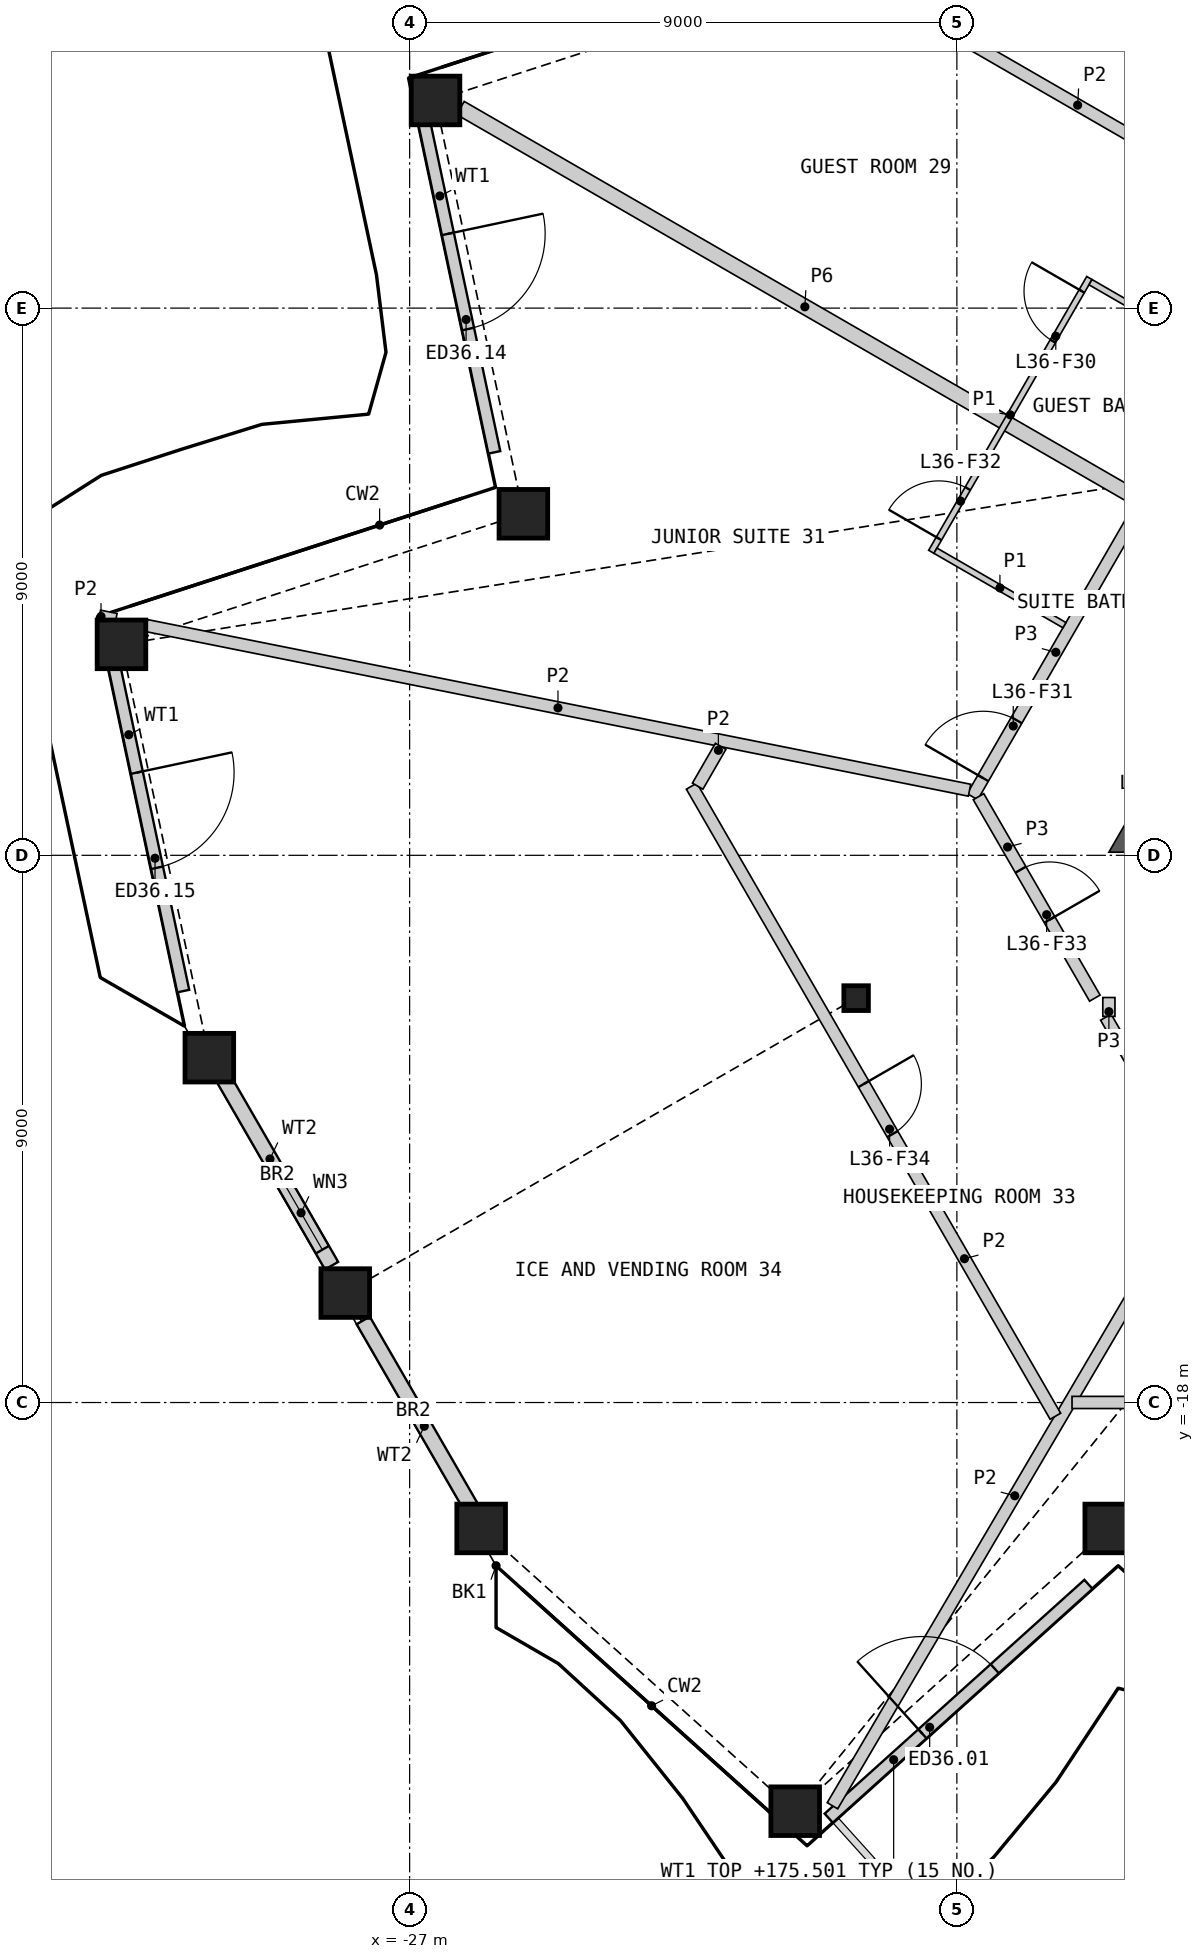
"""IFC4 building model, lengths in metres.
Left out: names, types, materials, properties, quantities, classifications, styles, units other than length and angle.
Written with IfcOpenShell. Run it as: python <this file> out.ifc"""

import sys

from ifc_helpers import new_model, si_unit, direction, frame, frame_2d, origin, origin_2d, place, context, subcontext, project, spatial, polyline, rectangle, hollow_rectangle, i_section, outline, extrude, element, fill, save


model = new_model("IFC4")
c1 = context("Model", 3, precision=1e-05, world=origin(), true_north=direction((0.0, 1.0)))
c2 = subcontext(c1, "Body", "Model", "MODEL_VIEW")
j1 = project(units=[si_unit("LENGTHUNIT", "METRE"), si_unit("PLANEANGLEUNIT", "RADIAN")], contexts=[c1])
p1 = place(None, origin())
s1 = spatial("IfcSite", under=j1, at=p1, CompositionType="ELEMENT")
p2 = place(p1, origin())
s2 = spatial("IfcBuilding", under=s1, at=p2, CompositionType="ELEMENT")
p3 = place(p2, frame((0.0, 0.0, 172.8)))
s3 = spatial("IfcBuildingStorey", under=s2, at=p3, CompositionType="ELEMENT", Elevation=172.8)
for number, where, z_axis, x_axis in (
    (1, (-25.823, -20.071, 0.0), (0.0, 0.0, 1.0), (1.0, 0.0, 0.0)),
    (2, (-20.659, -24.722, 0.0), (0.0, 0.0, 1.0), (1.0, 0.0, 0.0)),
    (3, (-15.494, -20.071, 0.0), (0.0, 0.0, 1.0), (1.0, 0.0, 0.0)),
    (4, (-26.574, 3.415, 0.0), (0.0, 0.0, 1.0), (1.0, 0.0, 0.0)),
    (5, (-25.129, -3.383, 0.0), (0.0, 0.0, 1.0), (1.0, 0.0, 0.0)),
    (6, (-31.739, -5.53, 0.0), (0.0, 0.0, 1.0), (1.0, 0.0, 0.0)),
    (7, (-30.294, -12.328, 0.0), (0.0, 0.0, 1.0), (1.0, 0.0, 0.0)),
    (8, (-28.059, -16.2, 0.0), (0.0, 0.0, 1.0), (1.0, 0.0, 0.0)),
):
    element("IfcColumn", number, at=place(p3, frame(where, z_axis=z_axis, x_axis=x_axis)), inside=s3, PredefinedType="COLUMN", context=c2, shape_type="SweptSolid", body=[
        extrude(hollow_rectangle(XDim=0.8, YDim=0.8, WallThickness=0.05, at=origin_2d()), origin(), (0.0, 0.0, 1.0), 3.6),
    ])
p4 = place(p3, frame((-19.657, -11.349, 0.0), z_axis=(0.0, 0.0, 1.0), x_axis=(1.0, 0.0, 0.0)))
e9 = element("IfcColumn", 9, at=p4, inside=s3, PredefinedType="COLUMN", context=c2, shape_type="SweptSolid", body=[
    extrude(i_section(OverallWidth=0.404, OverallDepth=0.407, WebThickness=0.027, FlangeThickness=0.044, at=origin_2d()), origin(), (0.0, 0.0, 1.0), 3.6),
])
p5 = place(p3, frame((-20.108, -24.836, 0.0), z_axis=(0.0, 0.0, 1.0), x_axis=(0.74315473474, 0.669119600844, 0.0)))
e10 = element("IfcWall", 10, at=p5, inside=s3, PredefinedType="SOLIDWALL", context=c2, shape_type="SweptSolid", body=[
    extrude(rectangle(XDim=5.748, YDim=0.2, at=frame_2d((2.874, 0.0))), origin(), (0.0, 0.0, 1.0), 2.701),
])
p6 = place(p5, frame((2.074, 0.0, 0.0)))
e11 = element("IfcOpeningElement", 11, at=p6, cuts=e10, PredefinedType="OPENING", context=c2, shape_type="SweptSolid", body=[
    extrude(rectangle(XDim=1.6, YDim=2.4, at=frame_2d((0.8, 1.2))), frame((0.0, 0.11, 0.0), z_axis=(0.0, -1.0, 0.0), x_axis=(1.0, 0.0, 0.0)), (0.0, 0.0, 1.0), 0.22),
])
p7 = place(p3, frame((-26.802, 3.25, 0.0), z_axis=(0.0, 0.0, 1.0), x_axis=(0.207921749173, -0.97814546271, 0.0)))
e12 = element("IfcWall", 12, at=p7, inside=s3, PredefinedType="SOLIDWALL", context=c2, shape_type="SweptSolid", body=[
    extrude(rectangle(XDim=5.748, YDim=0.2, at=frame_2d((2.874, 0.0))), origin(), (0.0, 0.0, 1.0), 2.701),
])
p8 = place(p7, frame((2.074, 0.0, 0.0)))
e13 = element("IfcOpeningElement", 13, at=p8, cuts=e12, PredefinedType="OPENING", context=c2, shape_type="SweptSolid", body=[
    extrude(rectangle(XDim=1.6, YDim=2.4, at=frame_2d((0.8, 1.2))), frame((0.0, 0.11, 0.0), z_axis=(0.0, -1.0, 0.0), x_axis=(1.0, 0.0, 0.0)), (0.0, 0.0, 1.0), 0.22),
])
p9 = place(p3, frame((-31.918, -5.611, 0.0), z_axis=(0.0, 0.0, 1.0), x_axis=(0.207913110781, -0.97814729891, 0.0)))
e14 = element("IfcWall", 14, at=p9, inside=s3, PredefinedType="SOLIDWALL", context=c2, shape_type="SweptSolid", body=[
    extrude(rectangle(XDim=5.748, YDim=0.2, at=frame_2d((2.874, 0.0))), origin(), (0.0, 0.0, 1.0), 2.701),
])
p10 = place(p9, frame((2.074, 0.0, 0.0)))
e15 = element("IfcOpeningElement", 15, at=p10, cuts=e14, PredefinedType="OPENING", context=c2, shape_type="SweptSolid", body=[
    extrude(rectangle(XDim=1.6, YDim=2.4, at=frame_2d((0.8, 1.2))), frame((0.0, 0.11, 0.0), z_axis=(0.0, -1.0, 0.0), x_axis=(1.0, 0.0, 0.0)), (0.0, 0.0, 1.0), 0.22),
])
p11 = place(p3, frame((-30.31, -12.239, 0.0), z_axis=(0.0, 0.0, 1.0), x_axis=(0.500005680777, -0.866022123962, 0.0)))
e16 = element("IfcWall", 16, at=p11, inside=s3, PredefinedType="SOLIDWALL", context=c2, shape_type="SweptSolid", body=[
    extrude(rectangle(XDim=4.054, YDim=0.25, at=frame_2d((2.027, 0.0))), origin(), (0.0, 0.0, 1.0), 2.701),
])
p12 = place(p11, frame((2.35, 0.0, 1.7)))
e17 = element("IfcOpeningElement", 17, at=p12, cuts=e16, PredefinedType="OPENING", context=c2, shape_type="SweptSolid", body=[
    extrude(rectangle(XDim=1.4, YDim=0.8, at=frame_2d((0.7, 0.4))), frame((0.0, 0.135, 0.0), z_axis=(0.0, -1.0, 0.0), x_axis=(1.0, 0.0, 0.0)), (0.0, 0.0, 1.0), 0.27),
])
p13 = place(p3, frame((-27.764, -16.65, 0.0), z_axis=(0.0, 0.0, 1.0), x_axis=(0.500039726511, -0.866002466458, 0.0)))
e18 = element("IfcWall", 18, at=p13, inside=s3, PredefinedType="SOLIDWALL", context=c2, shape_type="SweptSolid", body=[
    extrude(rectangle(XDim=4.019, YDim=0.25, at=frame_2d((2.009, 0.0))), origin(), (0.0, 0.0, 1.0), 2.701),
])
p14 = place(p3, origin())
e19 = element("IfcWall", 19, at=p14, inside=s3, PredefinedType="SHEAR", context=c2, shape_type="SweptSolid", body=[
    extrude(outline(polyline([(-14.851, -7.824), (-14.201, -8.199), (-14.201, -8.949), (-15.5, -8.949), (-14.851, -7.824)])), origin(), (0.0, 0.0, 1.0), 3.25),
])
p15 = place(p3, frame((-26.164, 3.292, 0.0), z_axis=(0.0, 0.0, 1.0), x_axis=(0.866022412254, -0.500005181446, 0.0)))
e20 = element("IfcWall", 20, at=p15, inside=s3, PredefinedType="PARTITIONING", context=c2, shape_type="SweptSolid", body=[
    extrude(rectangle(XDim=13.081, YDim=0.25, at=frame_2d((6.541, 0.0))), origin(), (0.0, 0.0, 1.0), 2.404),
])
p16 = place(p3, frame((-17.744, -8.035, 0.0), z_axis=(0.0, 0.0, 1.0), x_axis=(0.500007607708, 0.866021011428, 0.0)))
e21 = element("IfcWall", 21, at=p16, inside=s3, PredefinedType="PARTITIONING", context=c2, shape_type="SweptSolid", body=[
    extrude(rectangle(XDim=5.484, YDim=0.2, at=frame_2d((2.742, 0.0))), origin(), (0.0, 0.0, 1.0), 3.25),
])
p17 = place(p16, frame((0.352, 0.0, 0.0)))
e22 = element("IfcOpeningElement", 22, at=p17, cuts=e21, PredefinedType="OPENING", context=c2, shape_type="SweptSolid", body=[
    extrude(rectangle(XDim=1.1, YDim=2.1, at=frame_2d((0.55, 1.05))), frame((0.0, 0.11, 0.0), z_axis=(0.0, -1.0, 0.0), x_axis=(1.0, 0.0, 0.0)), (0.0, 0.0, 1.0), 0.22),
])
p18 = place(p3, frame((-17.644, -8.035, 0.0), z_axis=(0.0, 0.0, 1.0), x_axis=(0.499961815444, -0.866047448526, 0.0)))
e23 = element("IfcWall", 23, at=p18, inside=s3, PredefinedType="PARTITIONING", context=c2, shape_type="SweptSolid", body=[
    extrude(rectangle(XDim=3.826, YDim=0.2, at=frame_2d((1.913, 0.0))), origin(), (0.0, 0.0, 1.0), 3.25),
])
p19 = place(p18, frame((1.386, 0.0, 0.0)))
e24 = element("IfcOpeningElement", 24, at=p19, cuts=e23, PredefinedType="OPENING", context=c2, shape_type="SweptSolid", body=[
    extrude(rectangle(XDim=0.95, YDim=2.1, at=frame_2d((0.475, 1.05))), frame((0.0, 0.11, 0.0), z_axis=(0.0, -1.0, 0.0), x_axis=(1.0, 0.0, 0.0)), (0.0, 0.0, 1.0), 0.22),
])
p20 = place(p3, frame((-15.55, -11.662, 0.0), z_axis=(0.0, 0.0, 1.0), x_axis=(0.500048608389, -0.865997337899, 0.0)))
e25 = element("IfcWall", 25, at=p20, inside=s3, PredefinedType="PARTITIONING", context=c2, shape_type="SweptSolid", body=[
    extrude(rectangle(XDim=3.002, YDim=0.2, at=frame_2d((1.501, 0.0))), origin(), (0.0, 0.0, 1.0), 3.25),
])
p21 = place(p3, frame((-15.5, -11.649, 0.0), z_axis=(0.0, 0.0, 1.0), x_axis=(0.0, 1.0, 0.0)))
e26 = element("IfcWall", 26, at=p21, inside=s3, PredefinedType="PARTITIONING", context=c2, shape_type="SweptSolid", body=[
    extrude(rectangle(XDim=0.31, YDim=0.2, at=frame_2d((0.155, 0.0))), origin(), (0.0, 0.0, 1.0), 3.25),
])
p22 = place(p3, frame((-31.329, -5.221, 0.0), z_axis=(0.0, 0.0, 1.0), x_axis=(0.980565709097, -0.196190953266, 0.0)))
e27 = element("IfcWall", 27, at=p22, inside=s3, PredefinedType="PARTITIONING", context=c2, shape_type="SweptSolid", body=[
    extrude(rectangle(XDim=13.805, YDim=0.2, at=frame_2d((6.903, 0.0))), origin(), (0.0, 0.0, 1.0), 2.404),
])
p23 = place(p3, frame((-20.046, -24.632, 0.0), z_axis=(0.0, 0.0, 1.0), x_axis=(0.50691549935, 0.86199575203, 0.0)))
e28 = element("IfcWall", 28, at=p23, inside=s3, PredefinedType="PARTITIONING", context=c2, shape_type="SweptSolid", body=[
    extrude(rectangle(XDim=11.83, YDim=0.2, at=frame_2d((5.915, 0.0))), origin(), (0.0, 0.0, 1.0), 2.404),
])
p24 = place(p3, frame((-22.363, -7.862, 0.0), z_axis=(0.0, 0.0, 1.0), x_axis=(0.500009728207, -0.866019787128, 0.0)))
e29 = element("IfcWall", 29, at=p24, inside=s3, PredefinedType="PARTITIONING", context=c2, shape_type="SweptSolid", body=[
    extrude(rectangle(XDim=11.967, YDim=0.2, at=frame_2d((5.983, 0.0))), origin(), (0.0, 0.0, 1.0), 2.404),
])
p25 = place(p24, frame((5.658, 0.0, 0.0)))
e30 = element("IfcOpeningElement", 30, at=p25, cuts=e29, PredefinedType="OPENING", context=c2, shape_type="SweptSolid", body=[
    extrude(rectangle(XDim=0.95, YDim=2.1, at=frame_2d((0.475, 1.05))), frame((0.0, 0.11, 0.0), z_axis=(0.0, -1.0, 0.0), x_axis=(1.0, 0.0, 0.0)), (0.0, 0.0, 1.0), 0.22),
])
p26 = place(p3, frame((-19.555, 5.383, 0.0), z_axis=(0.0, 0.0, 1.0), x_axis=(0.866027979776, -0.499995538225, 0.0)))
e31 = element("IfcWall", 31, at=p26, inside=s3, PredefinedType="PARTITIONING", context=c2, shape_type="SweptSolid", body=[
    extrude(rectangle(XDim=8.177, YDim=0.2, at=frame_2d((4.089, 0.0))), origin(), (0.0, 0.0, 1.0), 2.404),
])
p27 = place(p3, frame((-16.106, -17.999, 0.0), z_axis=(0.0, 0.0, 1.0), x_axis=(1.0, 0.0, 0.0)))
e32 = element("IfcWall", 32, at=p27, inside=s3, PredefinedType="PARTITIONING", context=c2, shape_type="SweptSolid", body=[
    extrude(rectangle(XDim=5.775, YDim=0.2, at=frame_2d((2.887, 0.0))), origin(), (0.0, 0.0, 1.0), 2.404),
])
p28 = place(p27, frame((2.06, 0.0, 0.0)))
e33 = element("IfcOpeningElement", 33, at=p28, cuts=e32, PredefinedType="OPENING", context=c2, shape_type="SweptSolid", body=[
    extrude(rectangle(XDim=0.95, YDim=2.1, at=frame_2d((0.475, 1.05))), frame((0.0, 0.11, 0.0), z_axis=(0.0, -1.0, 0.0), x_axis=(1.0, 0.0, 0.0)), (0.0, 0.0, 1.0), 0.22),
])
p29 = place(p3, frame((-22.263, -7.862, 0.0), z_axis=(0.0, 0.0, 1.0), x_axis=(0.499852814723, 0.866110364569, 0.0)))
e34 = element("IfcWall", 34, at=p29, inside=s3, PredefinedType="PARTITIONING", context=c2, shape_type="SweptSolid", body=[
    extrude(rectangle(XDim=0.757, YDim=0.2, at=frame_2d((0.378, 0.0))), origin(), (0.0, 0.0, 1.0), 2.404),
])
p30 = place(p3, frame((-32.103, -5.066, 0.0), z_axis=(0.0, 0.0, 1.0), x_axis=(0.980512850695, -0.19645495571, 0.0)))
e35 = element("IfcWall", 35, at=p30, inside=s3, PredefinedType="PARTITIONING", context=c2, shape_type="SweptSolid", body=[
    extrude(rectangle(XDim=0.277, YDim=0.2, at=frame_2d((0.139, 0.0))), origin(), (0.0, 0.0, 1.0), 2.404),
])
p31 = place(p3, frame((-18.421, -4.008, 0.0), z_axis=(0.0, 0.0, 1.0), x_axis=(0.500006934395, 0.866021400173, 0.0)))
e36 = element("IfcWall", 36, at=p31, inside=s3, PredefinedType="PARTITIONING", context=c2, shape_type="SweptSolid", body=[
    extrude(rectangle(XDim=5.2, YDim=0.1, at=frame_2d((2.6, 0.0))), origin(), (0.0, 0.0, 1.0), 2.404),
])
p32 = place(p31, frame((4.0, 0.0, 0.0)))
e37 = element("IfcOpeningElement", 37, at=p32, cuts=e36, PredefinedType="OPENING", context=c2, shape_type="SweptSolid", body=[
    extrude(rectangle(XDim=0.95, YDim=2.1, at=frame_2d((0.475, 1.05))), frame((0.0, 0.06, 0.0), z_axis=(0.0, -1.0, 0.0), x_axis=(1.0, 0.0, 0.0)), (0.0, 0.0, 1.0), 0.12),
])
p33 = place(p31, frame((0.25, 0.0, 0.0)))
e38 = element("IfcOpeningElement", 38, at=p33, cuts=e36, PredefinedType="OPENING", context=c2, shape_type="SweptSolid", body=[
    extrude(rectangle(XDim=0.95, YDim=2.1, at=frame_2d((0.475, 1.05))), frame((0.0, 0.06, 0.0), z_axis=(0.0, -1.0, 0.0), x_axis=(1.0, 0.0, 0.0)), (0.0, 0.0, 1.0), 0.12),
])
p34 = place(p3, frame((-18.353, -3.99, 0.0), z_axis=(0.0, 0.0, 1.0), x_axis=(0.866057815567, -0.499943856944, 0.0)))
e39 = element("IfcWall", 39, at=p34, inside=s3, PredefinedType="PARTITIONING", context=c2, shape_type="SweptSolid", body=[
    extrude(rectangle(XDim=2.45, YDim=0.1, at=frame_2d((1.225, 0.0))), origin(), (0.0, 0.0, 1.0), 2.404),
])
p35 = place(p3, frame((-15.802, 0.427, 0.0), z_axis=(0.0, 0.0, 1.0), x_axis=(0.866032905446, -0.499987006516, 0.0)))
e40 = element("IfcWall", 40, at=p35, inside=s3, PredefinedType="PARTITIONING", context=c2, shape_type="SweptSolid", body=[
    extrude(rectangle(XDim=2.45, YDim=0.1, at=frame_2d((1.225, 0.0))), origin(), (0.0, 0.0, 1.0), 2.404),
])
p36 = place(p6, origin())
e41 = element("IfcDoor", 41, at=p36, inside=s3, OperationType="DOUBLE_DOOR_SINGLE_SWING", PredefinedType="DOOR", context=c2, shape_type="SweptSolid", body=[
    extrude(rectangle(XDim=1.6, YDim=2.4, at=frame_2d((0.8, 1.2))), frame((0.0, 0.025, 0.0), z_axis=(0.0, -1.0, 0.0), x_axis=(1.0, 0.0, 0.0)), (0.0, 0.0, 1.0), 0.05),
])
fill(e11, e41)
p37 = place(p8, origin())
e42 = element("IfcDoor", 42, at=p37, inside=s3, OperationType="DOUBLE_DOOR_SINGLE_SWING", PredefinedType="DOOR", context=c2, shape_type="SweptSolid", body=[
    extrude(rectangle(XDim=1.6, YDim=2.4, at=frame_2d((0.8, 1.2))), frame((0.0, 0.025, 0.0), z_axis=(0.0, -1.0, 0.0), x_axis=(1.0, 0.0, 0.0)), (0.0, 0.0, 1.0), 0.05),
])
fill(e13, e42)
p38 = place(p10, origin())
e43 = element("IfcDoor", 43, at=p38, inside=s3, OperationType="DOUBLE_DOOR_SINGLE_SWING", PredefinedType="DOOR", context=c2, shape_type="SweptSolid", body=[
    extrude(rectangle(XDim=1.6, YDim=2.4, at=frame_2d((0.8, 1.2))), frame((0.0, 0.025, 0.0), z_axis=(0.0, -1.0, 0.0), x_axis=(1.0, 0.0, 0.0)), (0.0, 0.0, 1.0), 0.05),
])
fill(e15, e43)
p39 = place(p12, origin())
e44 = element("IfcWindow", 44, at=p39, inside=s3, PartitioningType="SINGLE_PANEL", PredefinedType="WINDOW", context=c2, shape_type="SweptSolid", body=[
    extrude(rectangle(XDim=1.4, YDim=0.8, at=frame_2d((0.7, 0.4))), frame((0.0, 0.03, 0.0), z_axis=(0.0, -1.0, 0.0), x_axis=(1.0, 0.0, 0.0)), (0.0, 0.0, 1.0), 0.06),
])
fill(e17, e44)
p40 = place(p32, origin())
e45 = element("IfcDoor", 45, at=p40, inside=s3, OperationType="SINGLE_SWING_RIGHT", PredefinedType="DOOR", context=c2, shape_type="SweptSolid", body=[
    extrude(rectangle(XDim=0.95, YDim=2.1, at=frame_2d((0.475, 1.05))), frame((0.0, 0.025, 0.0), z_axis=(0.0, -1.0, 0.0), x_axis=(1.0, 0.0, 0.0)), (0.0, 0.0, 1.0), 0.05),
])
fill(e37, e45)
p41 = place(p17, origin())
e46 = element("IfcDoor", 46, at=p41, inside=s3, OperationType="SINGLE_SWING_LEFT", PredefinedType="DOOR", context=c2, shape_type="SweptSolid", body=[
    extrude(rectangle(XDim=1.1, YDim=2.1, at=frame_2d((0.55, 1.05))), frame((0.0, 0.025, 0.0), z_axis=(0.0, -1.0, 0.0), x_axis=(1.0, 0.0, 0.0)), (0.0, 0.0, 1.0), 0.05),
])
fill(e22, e46)
p42 = place(p33, origin())
e47 = element("IfcDoor", 47, at=p42, inside=s3, OperationType="SINGLE_SWING_LEFT", PredefinedType="DOOR", context=c2, shape_type="SweptSolid", body=[
    extrude(rectangle(XDim=0.95, YDim=2.1, at=frame_2d((0.475, 1.05))), frame((0.0, 0.025, 0.0), z_axis=(0.0, -1.0, 0.0), x_axis=(1.0, 0.0, 0.0)), (0.0, 0.0, 1.0), 0.05),
])
fill(e38, e47)
p43 = place(p19, origin())
e48 = element("IfcDoor", 48, at=p43, inside=s3, OperationType="SINGLE_SWING_RIGHT", PredefinedType="DOOR", context=c2, shape_type="SweptSolid", body=[
    extrude(rectangle(XDim=0.95, YDim=2.1, at=frame_2d((0.475, 1.05))), frame((0.0, 0.025, 0.0), z_axis=(0.0, -1.0, 0.0), x_axis=(1.0, 0.0, 0.0)), (0.0, 0.0, 1.0), 0.05),
])
fill(e24, e48)
p44 = place(p25, origin())
e49 = element("IfcDoor", 49, at=p44, inside=s3, OperationType="SINGLE_SWING_LEFT", PredefinedType="DOOR", context=c2, shape_type="SweptSolid", body=[
    extrude(rectangle(XDim=0.95, YDim=2.1, at=frame_2d((0.475, 1.05))), frame((0.0, 0.025, 0.0), z_axis=(0.0, -1.0, 0.0), x_axis=(1.0, 0.0, 0.0)), (0.0, 0.0, 1.0), 0.05),
])
fill(e30, e49)
save(model, sys.argv[1])
